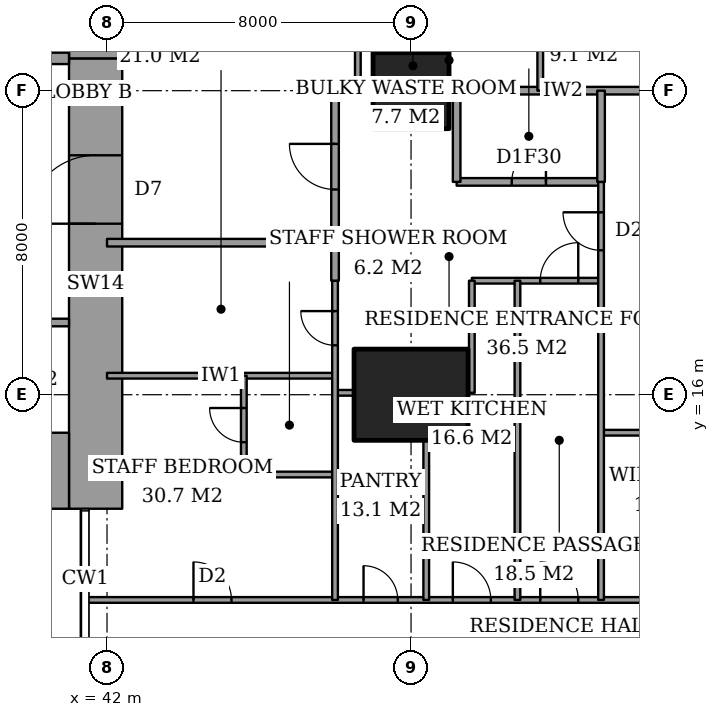
"""IFC4 building model, lengths in metres.
Left out: names, types, materials, properties, quantities, classifications, styles, units other than length and angle.
Written with IfcOpenShell. Run it as: python <this file> out.ifc"""

import sys

from ifc_helpers import new_model, si_unit, direction, frame, frame_2d, origin, origin_2d, place, context, subcontext, project, spatial, rectangle, extrude, element, fill, save


model = new_model("IFC4")
c1 = context("Model", 3, precision=1e-05, world=origin(), true_north=direction((0.0, 1.0)))
c2 = subcontext(c1, "Body", "Model", "MODEL_VIEW")
j1 = project(units=[si_unit("LENGTHUNIT", "METRE"), si_unit("PLANEANGLEUNIT", "RADIAN")], contexts=[c1])
p1 = place(None, origin())
s1 = spatial("IfcSite", under=j1, at=p1, CompositionType="ELEMENT")
p2 = place(p1, origin())
s2 = spatial("IfcBuilding", under=s1, at=p2, CompositionType="ELEMENT")
p3 = place(p2, frame((0.0, 0.0, 150.2)))
s3 = spatial("IfcBuildingStorey", under=s2, at=p3, CompositionType="ELEMENT", Elevation=150.2)
p4 = place(p3, frame((50.0, 16.0, 0.0), z_axis=(0.0, 0.0, 1.0), x_axis=(1.0, 0.0, 0.0)))
e1 = element("IfcColumn", 1, at=p4, inside=s3, PredefinedType="COLUMN", context=c2, shape_type="SweptSolid", body=[
    extrude(rectangle(XDim=3.0, YDim=2.4, at=origin_2d()), origin(), (0.0, 0.0, 1.0), 3.6),
])
p5 = place(p3, frame((50.0, 24.0, 0.0), z_axis=(0.0, 0.0, 1.0), x_axis=(1.0, 0.0, 0.0)))
e2 = element("IfcColumn", 2, at=p5, inside=s3, PredefinedType="COLUMN", context=c2, shape_type="SweptSolid", body=[
    extrude(rectangle(XDim=2.0, YDim=2.0, at=origin_2d()), origin(), (0.0, 0.0, 1.0), 3.6),
])
p6 = place(p3, frame((37.85, 14.0, 0.0), z_axis=(0.0, 0.0, 1.0), x_axis=(1.0, 0.0, 0.0)))
e3 = element("IfcWall", 3, at=p6, inside=s3, PredefinedType="SHEAR", context=c2, shape_type="SweptSolid", body=[
    extrude(rectangle(XDim=3.15, YDim=2.0, at=frame_2d((1.575, 0.0))), origin(), (0.0, 0.0, 1.0), 3.6),
])
p7 = place(p3, frame((41.7, 13.0, 0.0), z_axis=(0.0, 0.0, 1.0), x_axis=(0.0, 1.0, 0.0)))
e4 = element("IfcWall", 4, at=p7, inside=s3, PredefinedType="SHEAR", context=c2, shape_type="SweptSolid", body=[
    extrude(rectangle(XDim=11.85, YDim=1.4, at=frame_2d((5.925, 0.0))), origin(), (0.0, 0.0, 1.0), 3.6),
])
p8 = place(p7, frame((7.5, 0.0, 0.0)))
e5 = element("IfcOpeningElement", 5, at=p8, cuts=e4, PredefinedType="OPENING", context=c2, shape_type="SweptSolid", body=[
    extrude(rectangle(XDim=1.8, YDim=2.4, at=frame_2d((0.9, 1.2))), frame((0.0, 0.71, 0.0), z_axis=(0.0, -1.0, 0.0), x_axis=(1.0, 0.0, 0.0)), (0.0, 0.0, 1.0), 1.42),
])
p9 = place(p3, frame((41.7, 24.85, 0.0), z_axis=(0.0, 0.0, 1.0), x_axis=(0.0, 1.0, 0.0)))
e6 = element("IfcWall", 6, at=p9, inside=s3, PredefinedType="SHEAR", context=c2, shape_type="SweptSolid", body=[
    extrude(rectangle(XDim=10.15, YDim=1.4, at=frame_2d((5.075, 0.0))), origin(), (0.0, 0.0, 1.0), 3.6),
])
p10 = place(p3, frame((37.85, 24.85, 0.0), z_axis=(0.0, 0.0, 1.0), x_axis=(1.0, 0.0, 0.0)))
e7 = element("IfcWall", 7, at=p10, inside=s3, PredefinedType="SHEAR", context=c2, shape_type="SweptSolid", body=[
    extrude(rectangle(XDim=3.15, YDim=0.3, at=frame_2d((1.575, 0.0))), origin(), (0.0, 0.0, 1.0), 3.6),
])
p11 = place(p10, frame((0.95, 0.0, 0.0)))
e8 = element("IfcOpeningElement", 8, at=p11, cuts=e7, PredefinedType="OPENING", context=c2, shape_type="SweptSolid", body=[
    extrude(rectangle(XDim=1.0, YDim=2.1, at=frame_2d((0.5, 1.05))), frame((0.0, 0.16, 0.0), z_axis=(0.0, -1.0, 0.0), x_axis=(1.0, 0.0, 0.0)), (0.0, 0.0, 1.0), 0.32),
])
p12 = place(p3, frame((41.439, 10.6, 0.0), z_axis=(0.0, 0.0, 1.0), x_axis=(1.0, 0.0, 0.0)))
e9 = element("IfcWall", 9, at=p12, inside=s3, PredefinedType="PARTITIONING", context=c2, shape_type="SweptSolid", body=[
    extrude(rectangle(XDim=25.011, YDim=0.15, at=frame_2d((12.505, 0.0))), origin(), (0.0, 0.0, 1.0), 3.35),
])
p13 = place(p12, frame((11.961, 0.0, 0.0)))
e10 = element("IfcOpeningElement", 10, at=p13, cuts=e9, PredefinedType="OPENING", context=c2, shape_type="SweptSolid", body=[
    extrude(rectangle(XDim=1.0, YDim=2.1, at=frame_2d((0.5, 1.05))), frame((0.0, 0.085, 0.0), z_axis=(0.0, -1.0, 0.0), x_axis=(1.0, 0.0, 0.0)), (0.0, 0.0, 1.0), 0.17),
])
p14 = place(p12, frame((20.924, 0.0, 0.0)))
e11 = element("IfcOpeningElement", 11, at=p14, cuts=e9, PredefinedType="OPENING", context=c2, shape_type="SweptSolid", body=[
    extrude(rectangle(XDim=1.0, YDim=2.1, at=frame_2d((0.5, 1.05))), frame((0.0, 0.085, 0.0), z_axis=(0.0, -1.0, 0.0), x_axis=(1.0, 0.0, 0.0)), (0.0, 0.0, 1.0), 0.17),
])
p15 = place(p12, frame((15.249, 0.0, 0.0)))
e12 = element("IfcOpeningElement", 12, at=p15, cuts=e9, PredefinedType="OPENING", context=c2, shape_type="SweptSolid", body=[
    extrude(rectangle(XDim=0.9, YDim=2.1, at=frame_2d((0.45, 1.05))), frame((0.0, 0.085, 0.0), z_axis=(0.0, -1.0, 0.0), x_axis=(1.0, 0.0, 0.0)), (0.0, 0.0, 1.0), 0.17),
])
p16 = place(p12, frame((9.661, 0.0, 0.0)))
e13 = element("IfcOpeningElement", 13, at=p16, cuts=e9, PredefinedType="OPENING", context=c2, shape_type="SweptSolid", body=[
    extrude(rectangle(XDim=1.0, YDim=2.1, at=frame_2d((0.5, 1.05))), frame((0.0, 0.085, 0.0), z_axis=(0.0, -1.0, 0.0), x_axis=(1.0, 0.0, 0.0)), (0.0, 0.0, 1.0), 0.17),
])
p17 = place(p12, frame((7.311, 0.0, 0.0)))
e14 = element("IfcOpeningElement", 14, at=p17, cuts=e9, PredefinedType="OPENING", context=c2, shape_type="SweptSolid", body=[
    extrude(rectangle(XDim=0.9, YDim=2.1, at=frame_2d((0.45, 1.05))), frame((0.0, 0.085, 0.0), z_axis=(0.0, -1.0, 0.0), x_axis=(1.0, 0.0, 0.0)), (0.0, 0.0, 1.0), 0.17),
])
p18 = place(p12, frame((2.836, 0.0, 0.0)))
e15 = element("IfcOpeningElement", 15, at=p18, cuts=e9, PredefinedType="OPENING", context=c2, shape_type="SweptSolid", body=[
    extrude(rectangle(XDim=1.0, YDim=2.1, at=frame_2d((0.5, 1.05))), frame((0.0, 0.085, 0.0), z_axis=(0.0, -1.0, 0.0), x_axis=(1.0, 0.0, 0.0)), (0.0, 0.0, 1.0), 0.17),
])
p19 = place(p3, frame((45.6, 13.9, 0.0), z_axis=(0.0, 0.0, 1.0), x_axis=(1.0, 0.0, 0.0)))
e16 = element("IfcWall", 16, at=p19, inside=s3, PredefinedType="PARTITIONING", context=c2, shape_type="SweptSolid", body=[
    extrude(rectangle(XDim=2.4, YDim=0.15, at=frame_2d((1.2, 0.0))), origin(), (0.0, 0.0, 1.0), 3.35),
])
p20 = place(p3, frame((55.0, 15.0, 0.0), z_axis=(0.0, 0.0, 1.0), x_axis=(1.0, 0.0, 0.0)))
e17 = element("IfcWall", 17, at=p20, inside=s3, PredefinedType="PARTITIONING", context=c2, shape_type="SweptSolid", body=[
    extrude(rectangle(XDim=1.5, YDim=0.15, at=frame_2d((0.75, 0.0))), origin(), (0.0, 0.0, 1.0), 3.35),
])
p21 = place(p3, frame((48.0, 16.05, 0.0), z_axis=(0.0, 0.0, 1.0), x_axis=(1.0, 0.0, 0.0)))
e18 = element("IfcWall", 18, at=p21, inside=s3, PredefinedType="PARTITIONING", context=c2, shape_type="SweptSolid", body=[
    extrude(rectangle(XDim=0.5, YDim=0.15, at=frame_2d((0.25, 0.0))), origin(), (0.0, 0.0, 1.0), 2.634),
])
p22 = place(p3, frame((42.0, 16.5, 0.0), z_axis=(0.0, 0.0, 1.0), x_axis=(1.0, 0.0, 0.0)))
e19 = element("IfcWall", 19, at=p22, inside=s3, PredefinedType="PARTITIONING", context=c2, shape_type="SweptSolid", body=[
    extrude(rectangle(XDim=6.0, YDim=0.15, at=frame_2d((3.0, 0.0))), origin(), (0.0, 0.0, 1.0), 3.35),
])
p23 = place(p3, frame((51.6, 19.0, 0.0), z_axis=(0.0, 0.0, 1.0), x_axis=(1.0, 0.0, 0.0)))
e20 = element("IfcWall", 20, at=p23, inside=s3, PredefinedType="PARTITIONING", context=c2, shape_type="SweptSolid", body=[
    extrude(rectangle(XDim=3.4, YDim=0.15, at=frame_2d((1.7, 0.0))), origin(), (0.0, 0.0, 1.0), 3.35),
])
p24 = place(p23, frame((1.8, 0.0, 0.0)))
e21 = element("IfcOpeningElement", 21, at=p24, cuts=e20, PredefinedType="OPENING", context=c2, shape_type="SweptSolid", body=[
    extrude(rectangle(XDim=1.0, YDim=2.1, at=frame_2d((0.5, 1.05))), frame((0.0, 0.085, 0.0), z_axis=(0.0, -1.0, 0.0), x_axis=(1.0, 0.0, 0.0)), (0.0, 0.0, 1.0), 0.17),
])
p25 = place(p3, frame((42.0, 20.0, 0.0), z_axis=(0.0, 0.0, 1.0), x_axis=(1.0, 0.0, 0.0)))
e22 = element("IfcWall", 22, at=p25, inside=s3, PredefinedType="PARTITIONING", context=c2, shape_type="SweptSolid", body=[
    extrude(rectangle(XDim=6.0, YDim=0.2, at=frame_2d((3.0, 0.0))), origin(), (0.0, 0.0, 1.0), 3.35),
])
p26 = place(p3, frame((51.2, 21.6, 0.0), z_axis=(0.0, 0.0, 1.0), x_axis=(1.0, 0.0, 0.0)))
e23 = element("IfcWall", 23, at=p26, inside=s3, PredefinedType="PARTITIONING", context=c2, shape_type="SweptSolid", body=[
    extrude(rectangle(XDim=3.8, YDim=0.2, at=frame_2d((1.9, 0.0))), origin(), (0.0, 0.0, 1.0), 3.35),
])
p27 = place(p26, frame((1.45, 0.0, 0.0)))
e24 = element("IfcOpeningElement", 24, at=p27, cuts=e23, PredefinedType="OPENING", context=c2, shape_type="SweptSolid", body=[
    extrude(rectangle(XDim=0.9, YDim=2.1, at=frame_2d((0.45, 1.05))), frame((0.0, 0.11, 0.0), z_axis=(0.0, -1.0, 0.0), x_axis=(1.0, 0.0, 0.0)), (0.0, 0.0, 1.0), 0.22),
])
p28 = place(p3, frame((48.0, 24.0, 0.0), z_axis=(0.0, 0.0, 1.0), x_axis=(1.0, 0.0, 0.0)))
e25 = element("IfcWall", 25, at=p28, inside=s3, PredefinedType="PARTITIONING", context=c2, shape_type="SweptSolid", body=[
    extrude(rectangle(XDim=1.0, YDim=0.2, at=frame_2d((0.5, 0.0))), origin(), (0.0, 0.0, 1.0), 3.35),
])
p29 = place(p3, frame((51.0, 24.0, 0.0), z_axis=(0.0, 0.0, 1.0), x_axis=(1.0, 0.0, 0.0)))
e26 = element("IfcWall", 26, at=p29, inside=s3, PredefinedType="PARTITIONING", context=c2, shape_type="SweptSolid", body=[
    extrude(rectangle(XDim=6.0, YDim=0.2, at=frame_2d((3.0, 0.0))), origin(), (0.0, 0.0, 1.0), 3.35),
])
p30 = place(p3, frame((45.6, 13.9, 0.0), z_axis=(0.0, 0.0, 1.0), x_axis=(0.0, 1.0, 0.0)))
e27 = element("IfcWall", 27, at=p30, inside=s3, PredefinedType="PARTITIONING", context=c2, shape_type="SweptSolid", body=[
    extrude(rectangle(XDim=2.6, YDim=0.15, at=frame_2d((1.3, 0.0))), origin(), (0.0, 0.0, 1.0), 3.35),
])
p31 = place(p30, frame((0.85, 0.0, 0.0)))
e28 = element("IfcOpeningElement", 28, at=p31, cuts=e27, PredefinedType="OPENING", context=c2, shape_type="SweptSolid", body=[
    extrude(rectangle(XDim=0.9, YDim=2.1, at=frame_2d((0.45, 1.05))), frame((0.0, 0.085, 0.0), z_axis=(0.0, -1.0, 0.0), x_axis=(1.0, 0.0, 0.0)), (0.0, 0.0, 1.0), 0.17),
])
p32 = place(p3, frame((48.0, 19.0, 0.0), z_axis=(0.0, 0.0, 1.0), x_axis=(0.0, 1.0, 0.0)))
e29 = element("IfcWall", 29, at=p32, inside=s3, PredefinedType="PARTITIONING", context=c2, shape_type="SweptSolid", body=[
    extrude(rectangle(XDim=5.0, YDim=0.2, at=frame_2d((2.5, 0.0))), origin(), (0.0, 0.0, 1.0), 3.35),
])
p33 = place(p32, frame((2.4, 0.0, 0.0)))
e30 = element("IfcOpeningElement", 30, at=p33, cuts=e29, PredefinedType="OPENING", context=c2, shape_type="SweptSolid", body=[
    extrude(rectangle(XDim=1.2, YDim=2.4, at=frame_2d((0.6, 1.2))), frame((0.0, 0.11, 0.0), z_axis=(0.0, -1.0, 0.0), x_axis=(1.0, 0.0, 0.0)), (0.0, 0.0, 1.0), 0.22),
])
p34 = place(p3, frame((48.0, 10.6, 0.0), z_axis=(0.0, 0.0, 1.0), x_axis=(0.0, 1.0, 0.0)))
e31 = element("IfcWall", 31, at=p34, inside=s3, PredefinedType="PARTITIONING", context=c2, shape_type="SweptSolid", body=[
    extrude(rectangle(XDim=8.4, YDim=0.15, at=frame_2d((4.2, 0.0))), origin(), (0.0, 0.0, 1.0), 3.35),
])
p35 = place(p34, frame((6.7, 0.0, 0.0)))
e32 = element("IfcOpeningElement", 32, at=p35, cuts=e31, PredefinedType="OPENING", context=c2, shape_type="SweptSolid", body=[
    extrude(rectangle(XDim=0.9, YDim=2.1, at=frame_2d((0.45, 1.05))), frame((0.0, 0.085, 0.0), z_axis=(0.0, -1.0, 0.0), x_axis=(1.0, 0.0, 0.0)), (0.0, 0.0, 1.0), 0.17),
])
p36 = place(p3, frame((48.6, 24.0, 0.0), z_axis=(0.0, 0.0, 1.0), x_axis=(0.0, 1.0, 0.0)))
e33 = element("IfcWall", 33, at=p36, inside=s3, PredefinedType="PARTITIONING", context=c2, shape_type="SweptSolid", body=[
    extrude(rectangle(XDim=1.6, YDim=0.15, at=frame_2d((0.8, 0.0))), origin(), (0.0, 0.0, 1.0), 3.35),
])
p37 = place(p3, frame((50.4, 10.6, 0.0), z_axis=(0.0, 0.0, 1.0), x_axis=(0.0, 1.0, 0.0)))
e34 = element("IfcWall", 34, at=p37, inside=s3, PredefinedType="PARTITIONING", context=c2, shape_type="SweptSolid", body=[
    extrude(rectangle(XDim=4.2, YDim=0.15, at=frame_2d((2.1, 0.0))), origin(), (0.0, 0.0, 1.0), 3.35),
])
p38 = place(p3, frame((51.2, 21.6, 0.0), z_axis=(0.0, 0.0, 1.0), x_axis=(0.0, 1.0, 0.0)))
e35 = element("IfcWall", 35, at=p38, inside=s3, PredefinedType="PARTITIONING", context=c2, shape_type="SweptSolid", body=[
    extrude(rectangle(XDim=2.4, YDim=0.2, at=frame_2d((1.2, 0.0))), origin(), (0.0, 0.0, 1.0), 3.35),
])
p39 = place(p3, frame((51.6, 16.05, 0.0), z_axis=(0.0, 0.0, 1.0), x_axis=(0.0, 1.0, 0.0)))
e36 = element("IfcWall", 36, at=p39, inside=s3, PredefinedType="PARTITIONING", context=c2, shape_type="SweptSolid", body=[
    extrude(rectangle(XDim=2.95, YDim=0.15, at=frame_2d((1.475, 0.0))), origin(), (0.0, 0.0, 1.0), 3.35),
])
p40 = place(p3, frame((52.8, 10.6, 0.0), z_axis=(0.0, 0.0, 1.0), x_axis=(0.0, 1.0, 0.0)))
e37 = element("IfcWall", 37, at=p40, inside=s3, PredefinedType="PARTITIONING", context=c2, shape_type="SweptSolid", body=[
    extrude(rectangle(XDim=8.4, YDim=0.15, at=frame_2d((4.2, 0.0))), origin(), (0.0, 0.0, 1.0), 3.35),
])
p41 = place(p3, frame((53.4, 24.0, 0.0), z_axis=(0.0, 0.0, 1.0), x_axis=(0.0, 1.0, 0.0)))
e38 = element("IfcWall", 38, at=p41, inside=s3, PredefinedType="PARTITIONING", context=c2, shape_type="SweptSolid", body=[
    extrude(rectangle(XDim=1.6, YDim=0.15, at=frame_2d((0.8, 0.0))), origin(), (0.0, 0.0, 1.0), 3.35),
])
p42 = place(p3, frame((55.0, 21.6, 0.0), z_axis=(0.0, 0.0, 1.0), x_axis=(0.0, 1.0, 0.0)))
e39 = element("IfcWall", 39, at=p42, inside=s3, PredefinedType="PARTITIONING", context=c2, shape_type="SweptSolid", body=[
    extrude(rectangle(XDim=2.4, YDim=0.2, at=frame_2d((1.2, 0.0))), origin(), (0.0, 0.0, 1.0), 3.35),
])
p43 = place(p3, frame((55.0, 10.6, 0.0), z_axis=(0.0, 0.0, 1.0), x_axis=(0.0, 1.0, 0.0)))
e40 = element("IfcWall", 40, at=p43, inside=s3, PredefinedType="PARTITIONING", context=c2, shape_type="SweptSolid", body=[
    extrude(rectangle(XDim=11.0, YDim=0.15, at=frame_2d((5.5, 0.0))), origin(), (0.0, 0.0, 1.0), 3.35),
])
p44 = place(p43, frame((9.2, 0.0, 0.0)))
e41 = element("IfcOpeningElement", 41, at=p44, cuts=e40, PredefinedType="OPENING", context=c2, shape_type="SweptSolid", body=[
    extrude(rectangle(XDim=1.0, YDim=2.1, at=frame_2d((0.5, 1.05))), frame((0.0, 0.085, 0.0), z_axis=(0.0, -1.0, 0.0), x_axis=(1.0, 0.0, 0.0)), (0.0, 0.0, 1.0), 0.17),
])
p45 = place(p3, frame((28.3, 17.9, 0.0), z_axis=(0.0, 0.0, 1.0), x_axis=(1.0, 0.0, 0.0)))
e42 = element("IfcWall", 42, at=p45, inside=s3, PredefinedType="PARTITIONING", context=c2, shape_type="SweptSolid", body=[
    extrude(rectangle(XDim=12.7, YDim=0.2, at=frame_2d((6.35, 0.0))), origin(), (0.0, 0.0, 1.0), 3.6),
])
p46 = place(p45, frame((0.95, 0.0, 0.0)))
e43 = element("IfcOpeningElement", 43, at=p46, cuts=e42, PredefinedType="OPENING", context=c2, shape_type="SweptSolid", body=[
    extrude(rectangle(XDim=1.1, YDim=2.1, at=frame_2d((0.55, 1.05))), frame((0.0, 0.11, 0.0), z_axis=(0.0, -1.0, 0.0), x_axis=(1.0, 0.0, 0.0)), (0.0, 0.0, 1.0), 0.22),
])
p47 = place(p45, frame((4.15, 0.0, 0.0)))
e44 = element("IfcOpeningElement", 44, at=p47, cuts=e42, PredefinedType="OPENING", context=c2, shape_type="SweptSolid", body=[
    extrude(rectangle(XDim=1.1, YDim=2.1, at=frame_2d((0.55, 1.05))), frame((0.0, 0.11, 0.0), z_axis=(0.0, -1.0, 0.0), x_axis=(1.0, 0.0, 0.0)), (0.0, 0.0, 1.0), 0.22),
])
p48 = place(p45, frame((7.35, 0.0, 0.0)))
e45 = element("IfcOpeningElement", 45, at=p48, cuts=e42, PredefinedType="OPENING", context=c2, shape_type="SweptSolid", body=[
    extrude(rectangle(XDim=1.1, YDim=2.1, at=frame_2d((0.55, 1.05))), frame((0.0, 0.11, 0.0), z_axis=(0.0, -1.0, 0.0), x_axis=(1.0, 0.0, 0.0)), (0.0, 0.0, 1.0), 0.22),
])
p49 = place(p45, frame((10.6, 0.0, 0.0)))
e46 = element("IfcOpeningElement", 46, at=p49, cuts=e42, PredefinedType="OPENING", context=c2, shape_type="SweptSolid", body=[
    extrude(rectangle(XDim=1.2, YDim=2.1, at=frame_2d((0.6, 1.05))), frame((0.0, 0.11, 0.0), z_axis=(0.0, -1.0, 0.0), x_axis=(1.0, 0.0, 0.0)), (0.0, 0.0, 1.0), 0.22),
])
p50 = place(p13, origin())
e47 = element("IfcDoor", 47, at=p50, inside=s3, OperationType="SINGLE_SWING_RIGHT", PredefinedType="DOOR", context=c2, shape_type="SweptSolid", body=[
    extrude(rectangle(XDim=1.0, YDim=2.1, at=frame_2d((0.5, 1.05))), frame((0.0, 0.025, 0.0), z_axis=(0.0, -1.0, 0.0), x_axis=(1.0, 0.0, 0.0)), (0.0, 0.0, 1.0), 0.05),
])
fill(e10, e47)
p51 = place(p44, origin())
e48 = element("IfcDoor", 48, at=p51, inside=s3, OperationType="SINGLE_SWING_LEFT", PredefinedType="DOOR", context=c2, shape_type="SweptSolid", body=[
    extrude(rectangle(XDim=1.0, YDim=2.1, at=frame_2d((0.5, 1.05))), frame((0.0, 0.025, 0.0), z_axis=(0.0, -1.0, 0.0), x_axis=(1.0, 0.0, 0.0)), (0.0, 0.0, 1.0), 0.05),
])
fill(e41, e48)
p52 = place(p27, origin())
e49 = element("IfcDoor", 49, at=p52, inside=s3, OperationType="SINGLE_SWING_LEFT", PredefinedType="DOOR", context=c2, shape_type="SweptSolid", body=[
    extrude(rectangle(XDim=0.9, YDim=2.1, at=frame_2d((0.45, 1.05))), frame((0.0, 0.025, 0.0), z_axis=(0.0, -1.0, 0.0), x_axis=(1.0, 0.0, 0.0)), (0.0, 0.0, 1.0), 0.05),
])
fill(e24, e49)
p53 = place(p33, origin())
e50 = element("IfcDoor", 50, at=p53, inside=s3, OperationType="SINGLE_SWING_LEFT", PredefinedType="DOOR", context=c2, shape_type="SweptSolid", body=[
    extrude(rectangle(XDim=1.2, YDim=2.4, at=frame_2d((0.6, 1.2))), frame((0.0, 0.025, 0.0), z_axis=(0.0, -1.0, 0.0), x_axis=(1.0, 0.0, 0.0)), (0.0, 0.0, 1.0), 0.05),
])
fill(e30, e50)
p54 = place(p24, origin())
e51 = element("IfcDoor", 51, at=p54, inside=s3, OperationType="SINGLE_SWING_LEFT", PredefinedType="DOOR", context=c2, shape_type="SweptSolid", body=[
    extrude(rectangle(XDim=1.0, YDim=2.1, at=frame_2d((0.5, 1.05))), frame((0.0, 0.025, 0.0), z_axis=(0.0, -1.0, 0.0), x_axis=(1.0, 0.0, 0.0)), (0.0, 0.0, 1.0), 0.05),
])
fill(e21, e51)
p55 = place(p16, origin())
e52 = element("IfcDoor", 52, at=p55, inside=s3, OperationType="SINGLE_SWING_RIGHT", PredefinedType="DOOR", context=c2, shape_type="SweptSolid", body=[
    extrude(rectangle(XDim=1.0, YDim=2.1, at=frame_2d((0.5, 1.05))), frame((0.0, 0.025, 0.0), z_axis=(0.0, -1.0, 0.0), x_axis=(1.0, 0.0, 0.0)), (0.0, 0.0, 1.0), 0.05),
])
fill(e13, e52)
p56 = place(p17, origin())
e53 = element("IfcDoor", 53, at=p56, inside=s3, OperationType="SINGLE_SWING_RIGHT", PredefinedType="DOOR", context=c2, shape_type="SweptSolid", body=[
    extrude(rectangle(XDim=0.9, YDim=2.1, at=frame_2d((0.45, 1.05))), frame((0.0, 0.025, 0.0), z_axis=(0.0, -1.0, 0.0), x_axis=(1.0, 0.0, 0.0)), (0.0, 0.0, 1.0), 0.05),
])
fill(e14, e53)
p57 = place(p31, origin())
e54 = element("IfcDoor", 54, at=p57, inside=s3, OperationType="SINGLE_SWING_LEFT", PredefinedType="DOOR", context=c2, shape_type="SweptSolid", body=[
    extrude(rectangle(XDim=0.9, YDim=2.1, at=frame_2d((0.45, 1.05))), frame((0.0, 0.025, 0.0), z_axis=(0.0, -1.0, 0.0), x_axis=(1.0, 0.0, 0.0)), (0.0, 0.0, 1.0), 0.05),
])
fill(e28, e54)
p58 = place(p18, origin())
e55 = element("IfcDoor", 55, at=p58, inside=s3, OperationType="SINGLE_SWING_RIGHT", PredefinedType="DOOR", context=c2, shape_type="SweptSolid", body=[
    extrude(rectangle(XDim=1.0, YDim=2.1, at=frame_2d((0.5, 1.05))), frame((0.0, 0.025, 0.0), z_axis=(0.0, -1.0, 0.0), x_axis=(1.0, 0.0, 0.0)), (0.0, 0.0, 1.0), 0.05),
])
fill(e15, e55)
p59 = place(p35, origin())
e56 = element("IfcDoor", 56, at=p59, inside=s3, OperationType="SINGLE_SWING_LEFT", PredefinedType="DOOR", context=c2, shape_type="SweptSolid", body=[
    extrude(rectangle(XDim=0.9, YDim=2.1, at=frame_2d((0.45, 1.05))), frame((0.0, 0.025, 0.0), z_axis=(0.0, -1.0, 0.0), x_axis=(1.0, 0.0, 0.0)), (0.0, 0.0, 1.0), 0.05),
])
fill(e32, e56)
p60 = place(p8, origin())
e57 = element("IfcDoor", 57, at=p60, inside=s3, OperationType="DOUBLE_DOOR_DOUBLE_SWING", PredefinedType="DOOR", context=c2, shape_type="SweptSolid", body=[
    extrude(rectangle(XDim=1.8, YDim=2.4, at=frame_2d((0.9, 1.2))), frame((0.0, 0.025, 0.0), z_axis=(0.0, -1.0, 0.0), x_axis=(1.0, 0.0, 0.0)), (0.0, 0.0, 1.0), 0.05),
])
fill(e5, e57)
save(model, sys.argv[1])
